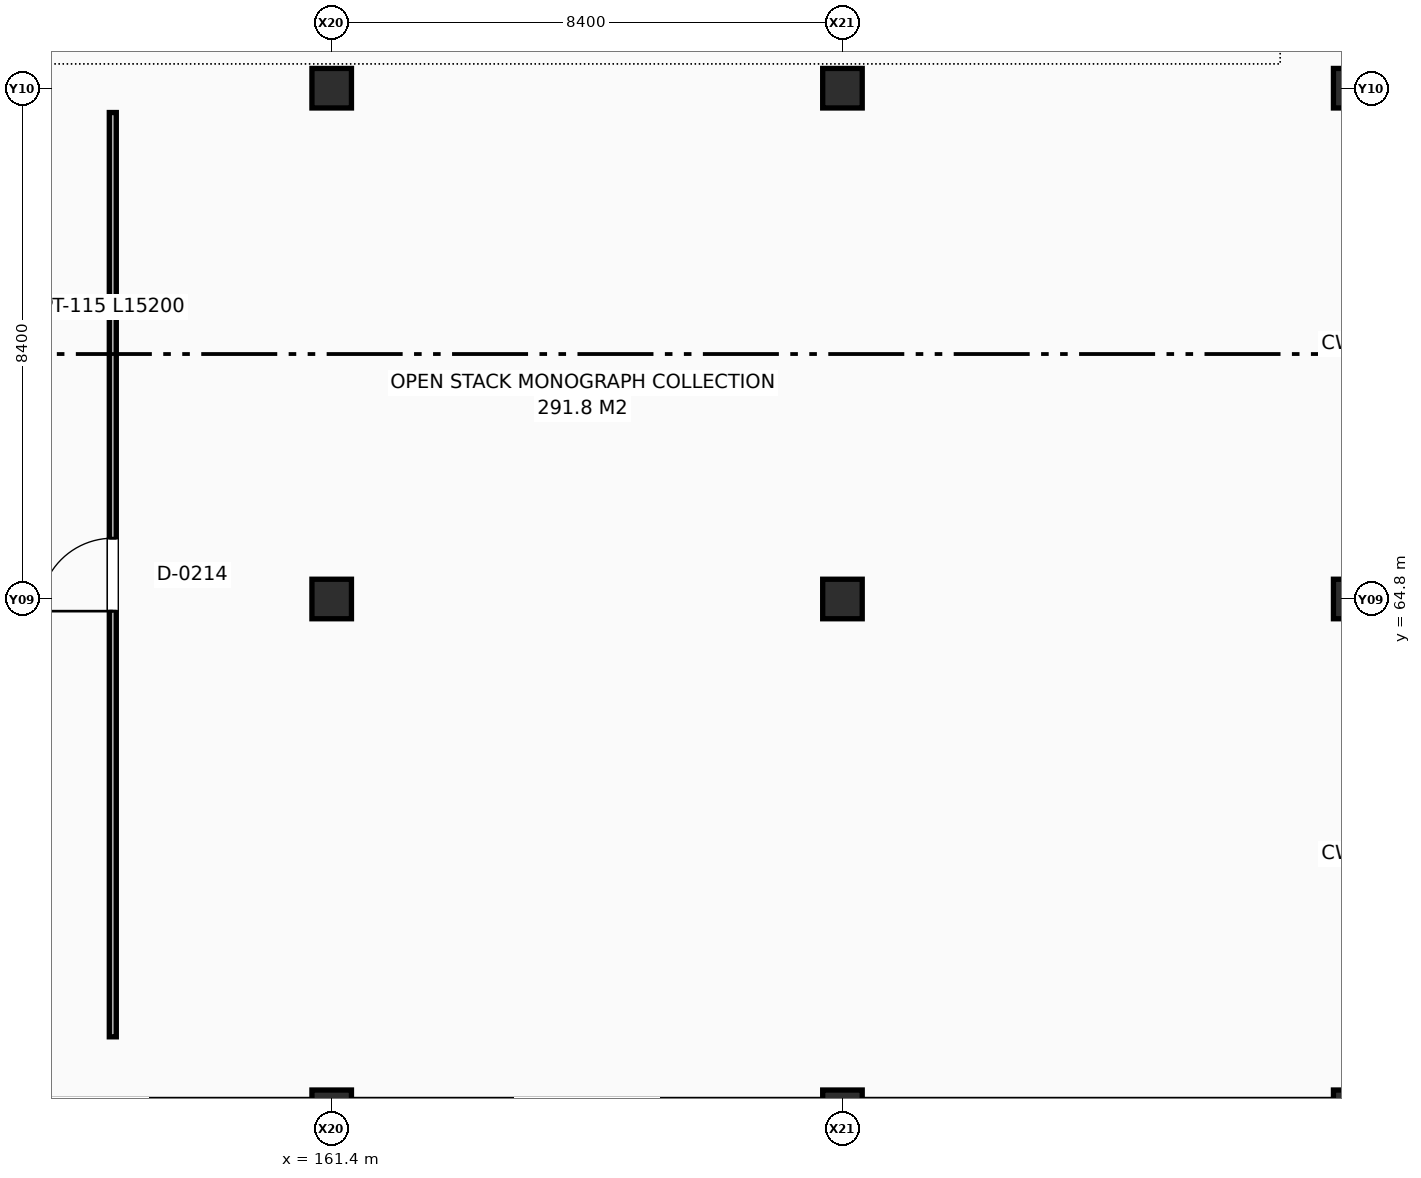
"""IFC4 building model, lengths in metres.
Left out: names, types, materials, properties, quantities, classifications, styles, units other than length and angle.
Written with IfcOpenShell. Run it as: python <this file> out.ifc"""

import sys

from ifc_helpers import new_model, si_unit, direction, frame, frame_2d, origin, origin_2d, place, context, subcontext, project, spatial, rectangle, extrude, element, fill, save


model = new_model("IFC4")
c1 = context("Model", 3, precision=1e-05, world=origin(), true_north=direction((0.0, 1.0)))
c2 = subcontext(c1, "Body", "Model", "MODEL_VIEW")
j1 = project(units=[si_unit("LENGTHUNIT", "METRE"), si_unit("PLANEANGLEUNIT", "RADIAN")], contexts=[c1])
p1 = place(None, origin())
s1 = spatial("IfcSite", under=j1, at=p1, CompositionType="ELEMENT")
p2 = place(p1, origin())
s2 = spatial("IfcBuilding", under=s1, at=p2, CompositionType="ELEMENT")
p3 = place(p2, frame((0.0, 0.0, 9.6)))
s3 = spatial("IfcBuildingStorey", under=s2, at=p3, CompositionType="ELEMENT", Elevation=9.6)
for number, where, z_axis, x_axis in (
    (1, (161.4, 56.4, 0.0), (0.0, 0.0, 1.0), (1.0, 0.0, 0.0)),
    (2, (161.4, 64.8, 0.0), (0.0, 0.0, 1.0), (1.0, 0.0, 0.0)),
    (3, (161.4, 73.2, 0.0), (0.0, 0.0, 1.0), (1.0, 0.0, 0.0)),
    (4, (169.8, 56.4, 0.0), (0.0, 0.0, 1.0), (1.0, 0.0, 0.0)),
    (5, (169.8, 64.8, 0.0), (0.0, 0.0, 1.0), (1.0, 0.0, 0.0)),
    (6, (169.8, 73.2, 0.0), (0.0, 0.0, 1.0), (1.0, 0.0, 0.0)),
    (7, (178.2, 56.4, 0.0), (0.0, 0.0, 1.0), (1.0, 0.0, 0.0)),
    (8, (178.2, 64.8, 0.0), (0.0, 0.0, 1.0), (1.0, 0.0, 0.0)),
    (9, (178.2, 73.2, 0.0), (0.0, 0.0, 1.0), (1.0, 0.0, 0.0)),
):
    element("IfcColumn", number, at=place(p3, frame(where, z_axis=z_axis, x_axis=x_axis)), inside=s3, PredefinedType="COLUMN", context=c2, shape_type="SweptSolid", body=[
        extrude(rectangle(XDim=0.65, YDim=0.65, at=origin_2d()), origin(), (0.0, 0.0, 1.0), 4.2),
    ])
p4 = place(p3, frame((157.8, 57.6, 0.0), z_axis=(0.0, 0.0, 1.0), x_axis=(0.0, 1.0, 0.0)))
e10 = element("IfcWall", 10, at=p4, inside=s3, PredefinedType="PARTITIONING", context=c2, shape_type="SweptSolid", body=[
    extrude(rectangle(XDim=15.2, YDim=0.115, at=frame_2d((7.6, 0.0))), origin(), (0.0, 0.0, 1.0), 3.86),
])
p5 = place(p4, frame((7.0, 0.0, 0.0)))
e11 = element("IfcOpeningElement", 11, at=p5, cuts=e10, PredefinedType="OPENING", context=c2, shape_type="SweptSolid", body=[
    extrude(rectangle(XDim=1.2, YDim=2.2, at=frame_2d((0.6, 1.1))), frame((0.0, 0.067, 0.0), z_axis=(0.0, -1.0, 0.0), x_axis=(1.0, 0.0, 0.0)), (0.0, 0.0, 1.0), 0.135),
])
p6 = place(p5, origin())
e12 = element("IfcDoor", 12, at=p6, inside=s3, OperationType="SINGLE_SWING_LEFT", PredefinedType="DOOR", context=c2, shape_type="SweptSolid", body=[
    extrude(rectangle(XDim=1.2, YDim=2.2, at=frame_2d((0.6, 1.1))), frame((0.0, 0.025, 0.0), z_axis=(0.0, -1.0, 0.0), x_axis=(1.0, 0.0, 0.0)), (0.0, 0.0, 1.0), 0.05),
])
fill(e11, e12)
save(model, sys.argv[1])
